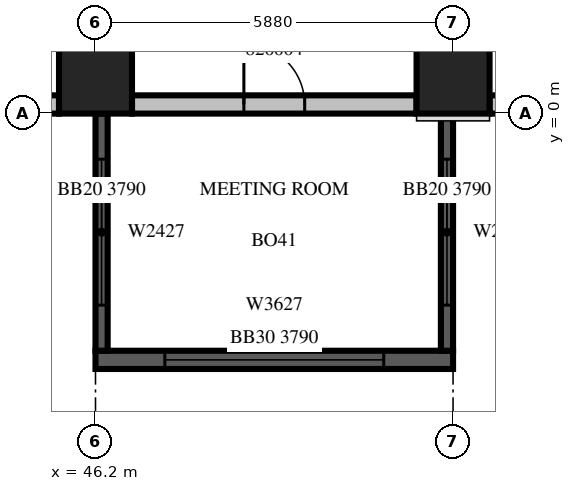
"""IFC4 building model, lengths in metres.
Left out: names, types, materials, properties, quantities, classifications, styles, units other than length and angle.
Written with IfcOpenShell. Run it as: python <this file> out.ifc"""

import sys

from ifc_helpers import new_model, si_unit, direction, frame, frame_2d, origin, origin_2d, place, context, subcontext, project, spatial, rectangle, extrude, source, transform, mapped, element, fill, save


model = new_model("IFC4")
c1 = context("Model", 3, precision=1e-05, world=origin(), true_north=direction((0.0, 1.0)))
c2 = subcontext(c1, "Body", "Model", "MODEL_VIEW")
j1 = project(units=[si_unit("LENGTHUNIT", "METRE"), si_unit("PLANEANGLEUNIT", "RADIAN")], contexts=[c1])
p1 = place(None, origin())
s1 = spatial("IfcSite", under=j1, at=p1, CompositionType="ELEMENT")
p2 = place(p1, origin())
s2 = spatial("IfcBuilding", under=s1, at=p2, CompositionType="ELEMENT")
p3 = place(p2, frame((0.0, 0.0, 95.1)))
s3 = spatial("IfcBuildingStorey", under=s2, at=p3, CompositionType="ELEMENT", Elevation=95.1)
m1 = source(origin(), c2, "Body", "SweptSolid", [
    extrude(rectangle(XDim=1.2, YDim=1.2, at=origin_2d()), origin(), (0.0, 0.0, 1.0), 4.2),
])
for number, where, z_axis, x_axis in (
    (1, (46.2, 0.6, 0.0), (0.0, 0.0, 1.0), (1.0, 0.0, 0.0)),
    (2, (52.08, 0.6, 0.0), (0.0, 0.0, 1.0), (1.0, 0.0, 0.0)),
):
    element("IfcColumn", number, at=place(p3, frame(where, z_axis=z_axis, x_axis=x_axis)), inside=s3, PredefinedType="COLUMN", context=c2, shape_type="MappedRepresentation", body=[
        mapped(m1, transform((0.0, 0.0, 0.0), scale=1.0)),
    ])
m2 = source(origin(), c2, "Body", "SweptSolid", [
    extrude(rectangle(XDim=1.6, YDim=0.3, at=frame_2d((0.8, 0.0))), origin(), (0.0, 0.0, 1.0), 3.8),
])
p4 = place(p3, frame((44.0, 0.15, 0.0), z_axis=(0.0, 0.0, 1.0), x_axis=(1.0, 0.0, 0.0)))
e3 = element("IfcWall", 3, at=p4, inside=s3, PredefinedType="STANDARD", context=c2, shape_type="MappedRepresentation", body=[
    mapped(m2, transform((0.0, 0.0, 0.0), scale=1.0)),
])
m3 = source(origin(), c2, "Body", "SweptSolid", [
    extrude(rectangle(XDim=0.9, YDim=2.7, at=frame_2d((0.45, 1.35))), frame((0.0, 0.16, 0.0), z_axis=(0.0, -1.0, 0.0), x_axis=(1.0, 0.0, 0.0)), (0.0, 0.0, 1.0), 0.32),
])
p5 = place(p4, frame((0.35, 0.0, 0.6)))
e4 = element("IfcOpeningElement", 4, at=p5, cuts=e3, PredefinedType="OPENING", context=c2, shape_type="MappedRepresentation", body=[
    mapped(m3, transform((0.0, 0.0, 0.0), scale=1.0)),
])
m4 = source(origin(), c2, "Body", "SweptSolid", [
    extrude(rectangle(XDim=4.68, YDim=0.3, at=frame_2d((2.34, 0.0))), origin(), (0.0, 0.0, 1.0), 3.8),
])
p6 = place(p3, frame((46.8, 0.15, 0.0), z_axis=(0.0, 0.0, 1.0), x_axis=(1.0, 0.0, 0.0)))
e5 = element("IfcWall", 5, at=p6, inside=s3, PredefinedType="STANDARD", context=c2, shape_type="MappedRepresentation", body=[
    mapped(m4, transform((0.0, 0.0, 0.0), scale=1.0)),
])
m5 = source(origin(), c2, "Body", "SweptSolid", [
    extrude(rectangle(XDim=1.0, YDim=2.1, at=frame_2d((0.5, 1.05))), frame((0.0, 0.16, 0.0), z_axis=(0.0, -1.0, 0.0), x_axis=(1.0, 0.0, 0.0)), (0.0, 0.0, 1.0), 0.32),
])
p7 = place(p6, frame((1.84, 0.0, 0.0)))
e6 = element("IfcOpeningElement", 6, at=p7, cuts=e5, PredefinedType="OPENING", context=c2, shape_type="MappedRepresentation", body=[
    mapped(m5, transform((0.0, 0.0, 0.0), scale=1.0)),
])
p8 = place(p3, frame((52.68, 0.15, 0.0), z_axis=(0.0, 0.0, 1.0), x_axis=(1.0, 0.0, 0.0)))
e7 = element("IfcWall", 7, at=p8, inside=s3, PredefinedType="STANDARD", context=c2, shape_type="MappedRepresentation", body=[
    mapped(m4, transform((0.0, 0.0, 0.0), scale=1.0)),
])
m6 = source(origin(), c2, "Body", "SweptSolid", [
    extrude(rectangle(XDim=3.6, YDim=2.7, at=frame_2d((1.8, 1.35))), frame((0.0, 0.16, 0.0), z_axis=(0.0, -1.0, 0.0), x_axis=(1.0, 0.0, 0.0)), (0.0, 0.0, 1.0), 0.32),
])
p9 = place(p8, frame((0.54, 0.0, 0.6)))
e8 = element("IfcOpeningElement", 8, at=p9, cuts=e7, PredefinedType="OPENING", context=c2, shape_type="MappedRepresentation", body=[
    mapped(m6, transform((0.0, 0.0, 0.0), scale=1.0)),
])
m7 = source(origin(), c2, "Body", "SweptSolid", [
    extrude(rectangle(XDim=5.88, YDim=0.3, at=frame_2d((2.94, 0.0))), origin(), (0.0, 0.0, 1.0), 3.79),
])
p10 = place(p3, frame((46.2, -4.05, 0.0), z_axis=(0.0, 0.0, 1.0), x_axis=(1.0, 0.0, 0.0)))
e9 = element("IfcWall", 9, at=p10, inside=s3, PredefinedType="SOLIDWALL", context=c2, shape_type="MappedRepresentation", body=[
    mapped(m7, transform((0.0, 0.0, 0.0), scale=1.0)),
])
p11 = place(p10, frame((1.14, 0.0, 0.6)))
e10 = element("IfcOpeningElement", 10, at=p11, cuts=e9, PredefinedType="OPENING", context=c2, shape_type="MappedRepresentation", body=[
    mapped(m6, transform((0.0, 0.0, 0.0), scale=1.0)),
])
m8 = source(origin(), c2, "Body", "SweptSolid", [
    extrude(rectangle(XDim=3.9, YDim=0.2, at=frame_2d((1.95, 0.0))), origin(), (0.0, 0.0, 1.0), 3.79),
])
p12 = place(p3, frame((46.3, 0.0, 0.0), z_axis=(0.0, 0.0, 1.0), x_axis=(0.0, -1.0, 0.0)))
e11 = element("IfcWall", 11, at=p12, inside=s3, PredefinedType="SOLIDWALL", context=c2, shape_type="MappedRepresentation", body=[
    mapped(m8, transform((0.0, 0.0, 0.0), scale=1.0)),
])
m9 = source(origin(), c2, "Body", "SweptSolid", [
    extrude(rectangle(XDim=2.4, YDim=2.7, at=frame_2d((1.2, 1.35))), frame((0.0, 0.11, 0.0), z_axis=(0.0, -1.0, 0.0), x_axis=(1.0, 0.0, 0.0)), (0.0, 0.0, 1.0), 0.22),
])
p13 = place(p12, frame((0.75, 0.0, 0.6)))
e12 = element("IfcOpeningElement", 12, at=p13, cuts=e11, PredefinedType="OPENING", context=c2, shape_type="MappedRepresentation", body=[
    mapped(m9, transform((0.0, 0.0, 0.0), scale=1.0)),
])
p14 = place(p3, frame((51.98, 0.0, 0.0), z_axis=(0.0, 0.0, 1.0), x_axis=(0.0, -1.0, 0.0)))
e13 = element("IfcWall", 13, at=p14, inside=s3, PredefinedType="SOLIDWALL", context=c2, shape_type="MappedRepresentation", body=[
    mapped(m8, transform((0.0, 0.0, 0.0), scale=1.0)),
])
p15 = place(p14, frame((0.75, 0.0, 0.6)))
e14 = element("IfcOpeningElement", 14, at=p15, cuts=e13, PredefinedType="OPENING", context=c2, shape_type="MappedRepresentation", body=[
    mapped(m9, transform((0.0, 0.0, 0.0), scale=1.0)),
])
m10 = source(origin(), c2, "Body", "SweptSolid", [
    extrude(rectangle(XDim=3.6, YDim=2.7, at=frame_2d((1.8, 1.35))), frame((0.0, 0.03, 0.0), z_axis=(0.0, -1.0, 0.0), x_axis=(1.0, 0.0, 0.0)), (0.0, 0.0, 1.0), 0.06),
])
p16 = place(p11, origin())
e15 = element("IfcWindow", 15, at=p16, inside=s3, PartitioningType="SINGLE_PANEL", PredefinedType="WINDOW", context=c2, shape_type="MappedRepresentation", body=[
    mapped(m10, transform((0.0, 0.0, 0.0), scale=1.0)),
])
fill(e10, e15)
m11 = source(origin(), c2, "Body", "SweptSolid", [
    extrude(rectangle(XDim=2.4, YDim=2.7, at=frame_2d((1.2, 1.35))), frame((0.0, 0.03, 0.0), z_axis=(0.0, -1.0, 0.0), x_axis=(1.0, 0.0, 0.0)), (0.0, 0.0, 1.0), 0.06),
])
p17 = place(p13, origin())
e16 = element("IfcWindow", 16, at=p17, inside=s3, PartitioningType="SINGLE_PANEL", PredefinedType="WINDOW", context=c2, shape_type="MappedRepresentation", body=[
    mapped(m11, transform((0.0, 0.0, 0.0), scale=1.0)),
])
fill(e12, e16)
p18 = place(p15, origin())
e17 = element("IfcWindow", 17, at=p18, inside=s3, PartitioningType="SINGLE_PANEL", PredefinedType="WINDOW", context=c2, shape_type="MappedRepresentation", body=[
    mapped(m11, transform((0.0, 0.0, 0.0), scale=1.0)),
])
fill(e14, e17)
m12 = source(origin(), c2, "Body", "SweptSolid", [
    extrude(rectangle(XDim=1.0, YDim=2.1, at=frame_2d((0.5, 1.05))), frame((0.0, 0.025, 0.0), z_axis=(0.0, -1.0, 0.0), x_axis=(1.0, 0.0, 0.0)), (0.0, 0.0, 1.0), 0.05),
])
p19 = place(p7, origin())
e18 = element("IfcDoor", 18, at=p19, inside=s3, OperationType="SINGLE_SWING_LEFT", PredefinedType="DOOR", context=c2, shape_type="MappedRepresentation", body=[
    mapped(m12, transform((0.0, 0.0, 0.0), scale=1.0)),
])
fill(e6, e18)
save(model, sys.argv[1])
